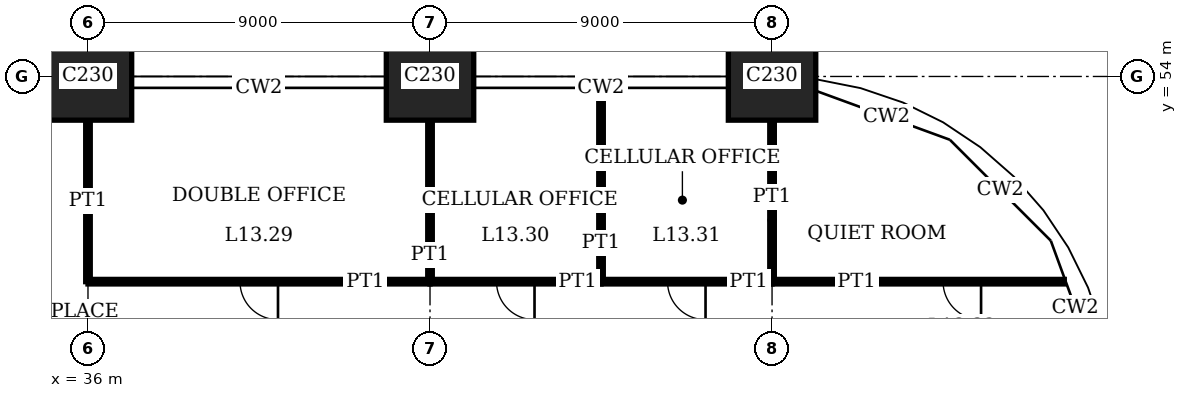
"""IFC4 building model, lengths in metres.
Left out: names, types, materials, properties, quantities, classifications, styles, units other than length and angle.
Written with IfcOpenShell. Run it as: python <this file> out.ifc"""

import sys

from ifc_helpers import new_model, si_unit, direction, frame, frame_2d, origin, origin_2d, place, context, subcontext, project, spatial, rectangle, extrude, element, fill, save


model = new_model("IFC4")
c1 = context("Model", 3, precision=1e-05, world=origin(), true_north=direction((0.0, 1.0)))
c2 = subcontext(c1, "Body", "Model", "MODEL_VIEW")
j1 = project(units=[si_unit("LENGTHUNIT", "METRE"), si_unit("PLANEANGLEUNIT", "RADIAN")], contexts=[c1])
p1 = place(None, origin())
s1 = spatial("IfcSite", under=j1, at=p1, CompositionType="ELEMENT")
p2 = place(p1, origin())
s2 = spatial("IfcBuilding", under=s1, at=p2, CompositionType="ELEMENT")
p3 = place(p2, frame((0.0, 0.0, 55.8)))
s3 = spatial("IfcBuildingStorey", under=s2, at=p3, CompositionType="ELEMENT", Elevation=55.8)
for number, where, z_axis, x_axis in (
    (1, (36.0, 54.0, 0.0), (0.0, 0.0, 1.0), (1.0, 0.0, 0.0)),
    (2, (45.0, 54.0, 0.0), (0.0, 0.0, 1.0), (1.0, 0.0, 0.0)),
    (3, (54.0, 54.0, 0.0), (0.0, 0.0, 1.0), (1.0, 0.0, 0.0)),
):
    element("IfcColumn", number, at=place(p3, frame(where, z_axis=z_axis, x_axis=x_axis)), inside=s3, PredefinedType="COLUMN", context=c2, shape_type="SweptSolid", body=[
        extrude(rectangle(XDim=2.3, YDim=2.3, at=origin_2d()), origin(), (0.0, 0.0, 1.0), 4.0),
    ])
p4 = place(p3, frame((36.0, 48.6, 0.0), z_axis=(0.0, 0.0, 1.0), x_axis=(1.0, 0.0, 0.0)))
e4 = element("IfcWall", 4, at=p4, inside=s3, PredefinedType="PARTITIONING", context=c2, shape_type="SweptSolid", body=[
    extrude(rectangle(XDim=9.0, YDim=0.12, at=frame_2d((4.5, 0.0))), origin(), (0.0, 0.0, 1.0), 3.75),
])
p5 = place(p4, frame((4.0, 0.0, 0.0)))
e5 = element("IfcOpeningElement", 5, at=p5, cuts=e4, PredefinedType="OPENING", context=c2, shape_type="SweptSolid", body=[
    extrude(rectangle(XDim=1.0, YDim=2.4, at=frame_2d((0.5, 1.2))), frame((0.0, 0.07, 0.0), z_axis=(0.0, -1.0, 0.0), x_axis=(1.0, 0.0, 0.0)), (0.0, 0.0, 1.0), 0.14),
])
p6 = place(p3, frame((45.0, 48.6, 0.0), z_axis=(0.0, 0.0, 1.0), x_axis=(1.0, 0.0, 0.0)))
e6 = element("IfcWall", 6, at=p6, inside=s3, PredefinedType="PARTITIONING", context=c2, shape_type="SweptSolid", body=[
    extrude(rectangle(XDim=4.5, YDim=0.12, at=frame_2d((2.25, 0.0))), origin(), (0.0, 0.0, 1.0), 3.75),
])
p7 = place(p6, frame((1.75, 0.0, 0.0)))
e7 = element("IfcOpeningElement", 7, at=p7, cuts=e6, PredefinedType="OPENING", context=c2, shape_type="SweptSolid", body=[
    extrude(rectangle(XDim=1.0, YDim=2.4, at=frame_2d((0.5, 1.2))), frame((0.0, 0.07, 0.0), z_axis=(0.0, -1.0, 0.0), x_axis=(1.0, 0.0, 0.0)), (0.0, 0.0, 1.0), 0.14),
])
p8 = place(p3, frame((49.5, 48.6, 0.0), z_axis=(0.0, 0.0, 1.0), x_axis=(1.0, 0.0, 0.0)))
e8 = element("IfcWall", 8, at=p8, inside=s3, PredefinedType="PARTITIONING", context=c2, shape_type="SweptSolid", body=[
    extrude(rectangle(XDim=4.5, YDim=0.12, at=frame_2d((2.25, 0.0))), origin(), (0.0, 0.0, 1.0), 3.75),
])
p9 = place(p8, frame((1.75, 0.0, 0.0)))
e9 = element("IfcOpeningElement", 9, at=p9, cuts=e8, PredefinedType="OPENING", context=c2, shape_type="SweptSolid", body=[
    extrude(rectangle(XDim=1.0, YDim=2.4, at=frame_2d((0.5, 1.2))), frame((0.0, 0.07, 0.0), z_axis=(0.0, -1.0, 0.0), x_axis=(1.0, 0.0, 0.0)), (0.0, 0.0, 1.0), 0.14),
])
p10 = place(p3, frame((54.0, 48.6, 0.0), z_axis=(0.0, 0.0, 1.0), x_axis=(1.0, 0.0, 0.0)))
e10 = element("IfcWall", 10, at=p10, inside=s3, PredefinedType="PARTITIONING", context=c2, shape_type="SweptSolid", body=[
    extrude(rectangle(XDim=7.69, YDim=0.12, at=frame_2d((3.845, 0.0))), origin(), (0.0, 0.0, 1.0), 3.75),
])
p11 = place(p10, frame((4.5, 0.0, 0.0)))
e11 = element("IfcOpeningElement", 11, at=p11, cuts=e10, PredefinedType="OPENING", context=c2, shape_type="SweptSolid", body=[
    extrude(rectangle(XDim=1.0, YDim=2.4, at=frame_2d((0.5, 1.2))), frame((0.0, 0.07, 0.0), z_axis=(0.0, -1.0, 0.0), x_axis=(1.0, 0.0, 0.0)), (0.0, 0.0, 1.0), 0.14),
])
for number, where, z_axis, x_axis in (
    (12, (36.0, 48.6, 0.0), (0.0, 0.0, 1.0), (0.0, 1.0, 0.0)),
    (13, (45.0, 48.6, 0.0), (0.0, 0.0, 1.0), (0.0, 1.0, 0.0)),
):
    element("IfcWall", number, at=place(p3, frame(where, z_axis=z_axis, x_axis=x_axis)), inside=s3, PredefinedType="PARTITIONING", context=c2, shape_type="SweptSolid", body=[
        extrude(rectangle(XDim=4.25, YDim=0.12, at=frame_2d((2.125, 0.0))), origin(), (0.0, 0.0, 1.0), 3.05),
    ])
p12 = place(p3, frame((49.5, 48.6, 0.0), z_axis=(0.0, 0.0, 1.0), x_axis=(0.0, 1.0, 0.0)))
e14 = element("IfcWall", 14, at=p12, inside=s3, PredefinedType="PARTITIONING", context=c2, shape_type="SweptSolid", body=[
    extrude(rectangle(XDim=5.09, YDim=0.12, at=frame_2d((2.545, 0.0))), origin(), (0.0, 0.0, 1.0), 3.75),
])
p13 = place(p3, frame((54.0, 48.6, 0.0), z_axis=(0.0, 0.0, 1.0), x_axis=(0.0, 1.0, 0.0)))
e15 = element("IfcWall", 15, at=p13, inside=s3, PredefinedType="PARTITIONING", context=c2, shape_type="SweptSolid", body=[
    extrude(rectangle(XDim=4.25, YDim=0.12, at=frame_2d((2.125, 0.0))), origin(), (0.0, 0.0, 1.0), 3.05),
])
p14 = place(p5, origin())
e16 = element("IfcDoor", 16, at=p14, inside=s3, OperationType="SINGLE_SWING_RIGHT", PredefinedType="DOOR", context=c2, shape_type="SweptSolid", body=[
    extrude(rectangle(XDim=1.0, YDim=2.4, at=frame_2d((0.5, 1.2))), frame((0.0, 0.025, 0.0), z_axis=(0.0, -1.0, 0.0), x_axis=(1.0, 0.0, 0.0)), (0.0, 0.0, 1.0), 0.05),
])
fill(e5, e16)
p15 = place(p7, origin())
e17 = element("IfcDoor", 17, at=p15, inside=s3, OperationType="SINGLE_SWING_RIGHT", PredefinedType="DOOR", context=c2, shape_type="SweptSolid", body=[
    extrude(rectangle(XDim=1.0, YDim=2.4, at=frame_2d((0.5, 1.2))), frame((0.0, 0.025, 0.0), z_axis=(0.0, -1.0, 0.0), x_axis=(1.0, 0.0, 0.0)), (0.0, 0.0, 1.0), 0.05),
])
fill(e7, e17)
p16 = place(p9, origin())
e18 = element("IfcDoor", 18, at=p16, inside=s3, OperationType="SINGLE_SWING_RIGHT", PredefinedType="DOOR", context=c2, shape_type="SweptSolid", body=[
    extrude(rectangle(XDim=1.0, YDim=2.4, at=frame_2d((0.5, 1.2))), frame((0.0, 0.025, 0.0), z_axis=(0.0, -1.0, 0.0), x_axis=(1.0, 0.0, 0.0)), (0.0, 0.0, 1.0), 0.05),
])
fill(e9, e18)
p17 = place(p11, origin())
e19 = element("IfcDoor", 19, at=p17, inside=s3, OperationType="SINGLE_SWING_RIGHT", PredefinedType="DOOR", context=c2, shape_type="SweptSolid", body=[
    extrude(rectangle(XDim=1.0, YDim=2.4, at=frame_2d((0.5, 1.2))), frame((0.0, 0.025, 0.0), z_axis=(0.0, -1.0, 0.0), x_axis=(1.0, 0.0, 0.0)), (0.0, 0.0, 1.0), 0.05),
])
fill(e11, e19)
save(model, sys.argv[1])
